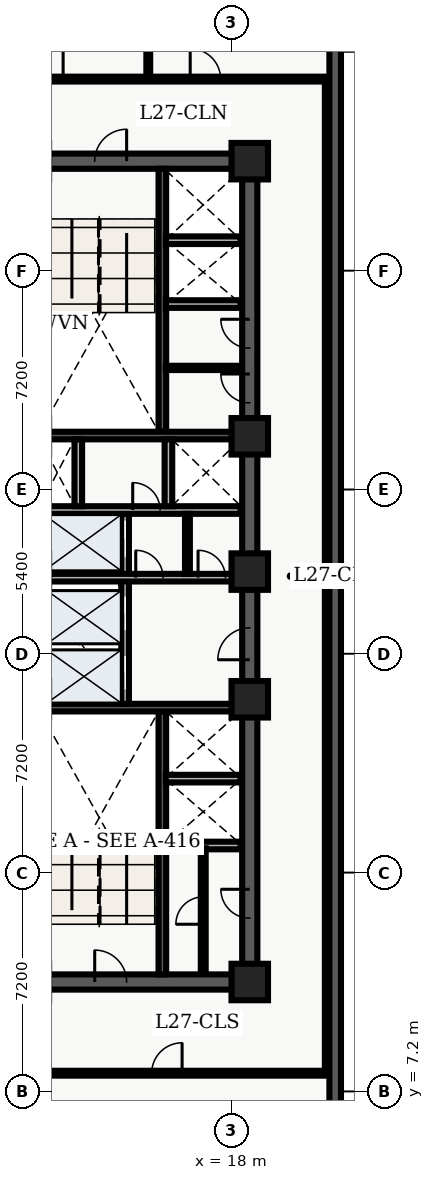
"""IFC4 building model, lengths in metres.
Left out: names, types, materials, properties, quantities, classifications, styles, units other than length and angle.
Written with IfcOpenShell. Run it as: python <this file> out.ifc"""

import sys

from ifc_helpers import new_model, entity, si_unit, converted_unit, direction, frame, origin_with_axes, origin_2d_with_axis, place, context, subcontext, project, spatial, polyline, rectangle, outline, extrude, element, fill, save


model = new_model("IFC4")
c1 = context("Model", 3, precision=1e-05, world=origin_with_axes(), true_north=direction((0.0, 1.0)))
c2 = subcontext(c1, "Body", "Model", "MODEL_VIEW")
j1 = project(units=[si_unit("LENGTHUNIT", "METRE"), converted_unit("PLANEANGLEUNIT", "DEGREE", entity("IfcPlaneAngleMeasure", 0.017), si_unit("PLANEANGLEUNIT", "RADIAN"), dimensions=[0, 0, 0, 0, 0, 0, 0])], contexts=[c1])
p1 = place(None, origin_with_axes())
s1 = spatial("IfcSite", under=j1, at=p1, CompositionType="ELEMENT")
p2 = place(p1, origin_with_axes())
s2 = spatial("IfcBuilding", under=s1, at=p2, CompositionType="ELEMENT")
p3 = place(p2, frame((0.0, 0.0, 112.5), z_axis=(0.0, 0.0, 1.0), x_axis=(1.0, 0.0, 0.0)))
s3 = spatial("IfcBuildingStorey", under=s2, at=p3, CompositionType="ELEMENT", Elevation=112.5)
p4 = place(p3, frame((11.4, 10.8, 0.0), z_axis=(0.0, 0.0, 1.0), x_axis=(1.0, 0.0, 0.0)))
e1 = element("IfcWall", 1, at=p4, inside=s3, PredefinedType="SHEAR", context=c2, shape_type="SweptSolid", body=[
    extrude(outline(polyline([(0.0, -0.25), (7.2, -0.25), (7.2, 0.25), (0.0, 0.25), (0.0, -0.25)])), origin_with_axes(), (0.0, 0.0, 1.0), 3.66),
])
p5 = place(p4, frame((2.625, 0.0, 0.0), z_axis=(0.0, 0.0, 1.0), x_axis=(1.0, 0.0, 0.0)))
e2 = element("IfcOpeningElement", 2, at=p5, cuts=e1, PredefinedType="OPENING", context=c2, shape_type="SweptSolid", body=[
    extrude(rectangle(XDim=1.05, YDim=0.52, at=origin_2d_with_axis()), origin_with_axes(), (0.0, 0.0, 1.0), 2.15),
])
p6 = place(p3, frame((11.4, 37.8, 0.0), z_axis=(0.0, 0.0, 1.0), x_axis=(1.0, 0.0, 0.0)))
e3 = element("IfcWall", 3, at=p6, inside=s3, PredefinedType="SHEAR", context=c2, shape_type="SweptSolid", body=[
    extrude(outline(polyline([(0.0, -0.25), (7.2, -0.25), (7.2, 0.25), (0.0, 0.25), (0.0, -0.25)])), origin_with_axes(), (0.0, 0.0, 1.0), 3.66),
])
p7 = place(p6, frame((2.625, 0.0, 0.0), z_axis=(0.0, 0.0, 1.0), x_axis=(1.0, 0.0, 0.0)))
e4 = element("IfcOpeningElement", 4, at=p7, cuts=e3, PredefinedType="OPENING", context=c2, shape_type="SweptSolid", body=[
    extrude(rectangle(XDim=1.05, YDim=0.52, at=origin_2d_with_axis()), origin_with_axes(), (0.0, 0.0, 1.0), 2.15),
])
p8 = place(p3, frame((18.6, 10.8, 0.0), z_axis=(0.0, 0.0, 1.0), x_axis=(0.0, 1.0, 0.0)))
e5 = element("IfcWall", 5, at=p8, inside=s3, PredefinedType="SHEAR", context=c2, shape_type="SweptSolid", body=[
    extrude(outline(polyline([(0.0, -0.25), (13.5, -0.25), (13.5, 0.25), (0.0, 0.25), (0.0, -0.25)])), origin_with_axes(), (0.0, 0.0, 1.0), 3.66),
])
p9 = place(p8, frame((11.125, 0.0, 0.0), z_axis=(0.0, 0.0, 1.0), x_axis=(1.0, 0.0, 0.0)))
e6 = element("IfcOpeningElement", 6, at=p9, cuts=e5, PredefinedType="OPENING", context=c2, shape_type="SweptSolid", body=[
    extrude(rectangle(XDim=1.05, YDim=0.52, at=origin_2d_with_axis()), origin_with_axes(), (0.0, 0.0, 1.0), 2.15),
])
p10 = place(p8, frame((2.575, 0.0, 0.0), z_axis=(0.0, 0.0, 1.0), x_axis=(1.0, 0.0, 0.0)))
e7 = element("IfcOpeningElement", 7, at=p10, cuts=e5, PredefinedType="OPENING", context=c2, shape_type="SweptSolid", body=[
    extrude(rectangle(XDim=0.95, YDim=0.52, at=origin_2d_with_axis()), origin_with_axes(), (0.0, 0.0, 1.0), 2.15),
])
p11 = place(p3, frame((18.6, 24.3, 0.0), z_axis=(0.0, 0.0, 1.0), x_axis=(0.0, 1.0, 0.0)))
e8 = element("IfcWall", 8, at=p11, inside=s3, PredefinedType="SHEAR", context=c2, shape_type="SweptSolid", body=[
    extrude(outline(polyline([(0.0, -0.25), (13.5, -0.25), (13.5, 0.25), (0.0, 0.25), (0.0, -0.25)])), origin_with_axes(), (0.0, 0.0, 1.0), 3.66),
])
p12 = place(p11, frame((6.025, 0.0, 0.0), z_axis=(0.0, 0.0, 1.0), x_axis=(1.0, 0.0, 0.0)))
e9 = element("IfcOpeningElement", 9, at=p12, cuts=e8, PredefinedType="OPENING", context=c2, shape_type="SweptSolid", body=[
    extrude(rectangle(XDim=0.95, YDim=0.52, at=origin_2d_with_axis()), origin_with_axes(), (0.0, 0.0, 1.0), 2.15),
])
p13 = place(p11, frame((7.825, 0.0, 0.0), z_axis=(0.0, 0.0, 1.0), x_axis=(1.0, 0.0, 0.0)))
e10 = element("IfcOpeningElement", 10, at=p13, cuts=e8, PredefinedType="OPENING", context=c2, shape_type="SweptSolid", body=[
    extrude(rectangle(XDim=0.95, YDim=0.52, at=origin_2d_with_axis()), origin_with_axes(), (0.0, 0.0, 1.0), 2.15),
])
p14 = place(p3, frame((15.725, 11.05, 0.0), z_axis=(0.0, 0.0, 1.0), x_axis=(0.0, 1.0, 0.0)))
e11 = element("IfcWall", 11, at=p14, inside=s3, PredefinedType="SHEAR", context=c2, shape_type="SweptSolid", body=[
    extrude(outline(polyline([(0.0, -0.125), (8.65, -0.125), (8.65, 0.125), (0.0, 0.125), (0.0, -0.125)])), origin_with_axes(), (0.0, 0.0, 1.0), 3.66),
])
p15 = place(p3, frame((11.65, 19.825, 0.0), z_axis=(0.0, 0.0, 1.0), x_axis=(1.0, 0.0, 0.0)))
e12 = element("IfcWall", 12, at=p15, inside=s3, PredefinedType="SHEAR", context=c2, shape_type="SweptSolid", body=[
    extrude(outline(polyline([(0.0, -0.125), (6.7, -0.125), (6.7, 0.125), (0.0, 0.125), (0.0, -0.125)])), origin_with_axes(), (0.0, 0.0, 1.0), 3.66),
])
p16 = place(p3, frame((15.725, 28.9, 0.0), z_axis=(0.0, 0.0, 1.0), x_axis=(0.0, 1.0, 0.0)))
e13 = element("IfcWall", 13, at=p16, inside=s3, PredefinedType="SHEAR", context=c2, shape_type="SweptSolid", body=[
    extrude(outline(polyline([(0.0, -0.125), (8.65, -0.125), (8.65, 0.125), (0.0, 0.125), (0.0, -0.125)])), origin_with_axes(), (0.0, 0.0, 1.0), 3.66),
])
p17 = place(p3, frame((11.65, 28.775, 0.0), z_axis=(0.0, 0.0, 1.0), x_axis=(1.0, 0.0, 0.0)))
e14 = element("IfcWall", 14, at=p17, inside=s3, PredefinedType="SHEAR", context=c2, shape_type="SweptSolid", body=[
    extrude(outline(polyline([(0.0, -0.125), (6.7, -0.125), (6.7, 0.125), (0.0, 0.125), (0.0, -0.125)])), origin_with_axes(), (0.0, 0.0, 1.0), 3.66),
])
p18 = place(p3, frame((14.5, 19.95, 0.0), z_axis=(0.0, 0.0, 1.0), x_axis=(0.0, 1.0, 0.0)))
e15 = element("IfcWall", 15, at=p18, inside=s3, PredefinedType="SOLIDWALL", context=c2, shape_type="SweptSolid", body=[
    extrude(outline(polyline([(0.0, -0.125), (6.25, -0.125), (6.25, 0.125), (0.0, 0.125), (0.0, -0.125)])), origin_with_axes(), (0.0, 0.0, 1.0), 2.7),
])
p19 = place(p18, frame((1.025, 0.0, 0.0), z_axis=(0.0, 0.0, 1.0), x_axis=(1.0, 0.0, 0.0)))
e16 = element("IfcOpeningElement", 16, at=p19, cuts=e15, PredefinedType="OPENING", context=c2, shape_type="SweptSolid", body=[
    extrude(rectangle(XDim=1.1, YDim=0.27, at=origin_2d_with_axis()), origin_with_axes(), (0.0, 0.0, 1.0), 2.15),
])
p20 = place(p18, frame((2.975, 0.0, 0.0), z_axis=(0.0, 0.0, 1.0), x_axis=(1.0, 0.0, 0.0)))
e17 = element("IfcOpeningElement", 17, at=p20, cuts=e15, PredefinedType="OPENING", context=c2, shape_type="SweptSolid", body=[
    extrude(rectangle(XDim=1.1, YDim=0.27, at=origin_2d_with_axis()), origin_with_axes(), (0.0, 0.0, 1.0), 2.15),
])
p21 = place(p18, frame((5.425, 0.0, 0.0), z_axis=(0.0, 0.0, 1.0), x_axis=(1.0, 0.0, 0.0)))
e18 = element("IfcOpeningElement", 18, at=p21, cuts=e15, PredefinedType="OPENING", context=c2, shape_type="SweptSolid", body=[
    extrude(rectangle(XDim=1.2, YDim=0.27, at=origin_2d_with_axis()), origin_with_axes(), (0.0, 0.0, 1.0), 2.15),
])
p22 = place(p3, frame((11.7, 24.1, 0.0), z_axis=(0.0, 0.0, 1.0), x_axis=(1.0, 0.0, 0.0)))
e19 = element("IfcWall", 19, at=p22, inside=s3, PredefinedType="SOLIDWALL", context=c2, shape_type="SweptSolid", body=[
    extrude(outline(polyline([(0.0, -0.125), (6.6, -0.125), (6.6, 0.125), (0.0, 0.125), (0.0, -0.125)])), origin_with_axes(), (0.0, 0.0, 1.0), 2.7),
])
p23 = place(p22, frame((3.6, 0.0, 0.0), z_axis=(0.0, 0.0, 1.0), x_axis=(1.0, 0.0, 0.0)))
e20 = element("IfcOpeningElement", 20, at=p23, cuts=e19, PredefinedType="OPENING", context=c2, shape_type="SweptSolid", body=[
    extrude(rectangle(XDim=0.9, YDim=0.27, at=origin_2d_with_axis()), origin_with_axes(), (0.0, 0.0, 1.0), 2.15),
])
p24 = place(p22, frame((5.65, 0.0, 0.0), z_axis=(0.0, 0.0, 1.0), x_axis=(1.0, 0.0, 0.0)))
e21 = element("IfcOpeningElement", 21, at=p24, cuts=e19, PredefinedType="OPENING", context=c2, shape_type="SweptSolid", body=[
    extrude(rectangle(XDim=0.9, YDim=0.27, at=origin_2d_with_axis()), origin_with_axes(), (0.0, 0.0, 1.0), 2.15),
])
p25 = place(p3, frame((11.7, 26.325, 0.0), z_axis=(0.0, 0.0, 1.0), x_axis=(1.0, 0.0, 0.0)))
e22 = element("IfcWall", 22, at=p25, inside=s3, PredefinedType="SOLIDWALL", context=c2, shape_type="SweptSolid", body=[
    extrude(outline(polyline([(0.0, -0.125), (6.6, -0.125), (6.6, 0.125), (0.0, 0.125), (0.0, -0.125)])), origin_with_axes(), (0.0, 0.0, 1.0), 2.7),
])
p26 = place(p25, frame((3.5, 0.0, 0.0), z_axis=(0.0, 0.0, 1.0), x_axis=(1.0, 0.0, 0.0)))
e23 = element("IfcOpeningElement", 23, at=p26, cuts=e22, PredefinedType="OPENING", context=c2, shape_type="SweptSolid", body=[
    extrude(rectangle(XDim=0.9, YDim=0.27, at=origin_2d_with_axis()), origin_with_axes(), (0.0, 0.0, 1.0), 2.15),
])
for number, where, z_axis, x_axis in (
    (24, (12.96, 26.45, 0.0), (0.0, 0.0, 1.0), (0.0, 1.0, 0.0)),
    (25, (15.925, 26.45, 0.0), (0.0, 0.0, 1.0), (0.0, 1.0, 0.0)),
):
    element("IfcWall", number, at=place(p3, frame(where, z_axis=z_axis, x_axis=x_axis)), inside=s3, PredefinedType="SOLIDWALL", context=c2, shape_type="SweptSolid", body=[
        extrude(outline(polyline([(0.0, -0.125), (2.2, -0.125), (2.2, 0.125), (0.0, 0.125), (0.0, -0.125)])), origin_with_axes(), (0.0, 0.0, 1.0), 2.7),
    ])
for number, where, z_axis, x_axis in (
    (26, (18.6, 10.8, 0.0), (0.0, 0.0, 1.0), (1.0, 0.0, 0.0)),
    (27, (18.6, 20.1, 0.0), (0.0, 0.0, 1.0), (1.0, 0.0, 0.0)),
    (28, (18.6, 24.3, 0.0), (0.0, 0.0, 1.0), (1.0, 0.0, 0.0)),
    (29, (18.6, 28.75, 0.0), (0.0, 0.0, 1.0), (1.0, 0.0, 0.0)),
    (30, (18.6, 37.8, 0.0), (0.0, 0.0, 1.0), (1.0, 0.0, 0.0)),
):
    element("IfcColumn", number, at=place(p3, frame(where, z_axis=z_axis, x_axis=x_axis)), inside=s3, PredefinedType="COLUMN", context=c2, shape_type="SweptSolid", body=[
        extrude(rectangle(XDim=1.2, YDim=1.2, at=origin_2d_with_axis()), origin_with_axes(), (0.0, 0.0, 1.0), 3.9),
    ])
p27 = place(p3, frame((16.55, 24.22, 0.0), z_axis=(0.0, 0.0, 1.0), x_axis=(0.0, 1.0, 0.0)))
e31 = element("IfcWall", 31, at=p27, inside=s3, PredefinedType="PARTITIONING", context=c2, shape_type="SweptSolid", body=[
    extrude(outline(polyline([(0.0, -0.08), (1.98, -0.08), (1.98, 0.08), (0.0, 0.08), (0.0, -0.08)])), origin_with_axes(), (0.0, 0.0, 1.0), 2.7),
])
for number, where, z_axis, x_axis in (
    (32, (15.84, 15.29, 0.0), (0.0, 0.0, 1.0), (1.0, 0.0, 0.0)),
    (33, (15.84, 17.49, 0.0), (0.0, 0.0, 1.0), (1.0, 0.0, 0.0)),
):
    element("IfcWall", number, at=place(p3, frame(where, z_axis=z_axis, x_axis=x_axis)), inside=s3, PredefinedType="SOLIDWALL", context=c2, shape_type="SweptSolid", body=[
        extrude(outline(polyline([(0.0, -0.125), (2.46, -0.125), (2.46, 0.125), (0.0, 0.125), (0.0, -0.125)])), origin_with_axes(), (0.0, 0.0, 1.0), 2.7),
    ])
p28 = place(p3, frame((17.07, 11.1, 0.0), z_axis=(0.0, 0.0, 1.0), x_axis=(0.0, 1.0, 0.0)))
e34 = element("IfcWall", 34, at=p28, inside=s3, PredefinedType="PARTITIONING", context=c2, shape_type="SweptSolid", body=[
    extrude(outline(polyline([(0.0, -0.08), (4.1, -0.08), (4.1, 0.08), (0.0, 0.08), (0.0, -0.08)])), origin_with_axes(), (0.0, 0.0, 1.0), 2.7),
])
p29 = place(p28, frame((2.05, 0.0, 0.0), z_axis=(0.0, 0.0, 1.0), x_axis=(1.0, 0.0, 0.0)))
e35 = element("IfcOpeningElement", 35, at=p29, cuts=e34, PredefinedType="OPENING", context=c2, shape_type="SweptSolid", body=[
    extrude(rectangle(XDim=0.9, YDim=0.18, at=origin_2d_with_axis()), origin_with_axes(), (0.0, 0.0, 1.0), 2.15),
])
for number, where, z_axis, x_axis in (
    (36, (15.84, 33.1, 0.0), (0.0, 0.0, 1.0), (1.0, 0.0, 0.0)),
    (37, (15.84, 35.2, 0.0), (0.0, 0.0, 1.0), (1.0, 0.0, 0.0)),
):
    element("IfcWall", number, at=place(p3, frame(where, z_axis=z_axis, x_axis=x_axis)), inside=s3, PredefinedType="SOLIDWALL", context=c2, shape_type="SweptSolid", body=[
        extrude(outline(polyline([(0.0, -0.125), (2.46, -0.125), (2.46, 0.125), (0.0, 0.125), (0.0, -0.125)])), origin_with_axes(), (0.0, 0.0, 1.0), 2.7),
    ])
p30 = place(p3, frame((15.84, 31.0, 0.0), z_axis=(0.0, 0.0, 1.0), x_axis=(1.0, 0.0, 0.0)))
e38 = element("IfcWall", 38, at=p30, inside=s3, PredefinedType="PARTITIONING", context=c2, shape_type="SweptSolid", body=[
    extrude(outline(polyline([(0.0, -0.07), (2.46, -0.07), (2.46, 0.07), (0.0, 0.07), (0.0, -0.07)])), origin_with_axes(), (0.0, 0.0, 1.0), 2.7),
])
p31 = place(p3, frame((2.6, 7.8, 0.0), z_axis=(0.0, 0.0, 1.0), x_axis=(1.0, 0.0, 0.0)))
e39 = element("IfcWall", 39, at=p31, inside=s3, PredefinedType="PARTITIONING", context=c2, shape_type="SweptSolid", body=[
    extrude(outline(polyline([(0.0, -0.08), (18.625, -0.08), (18.625, 0.08), (0.0, 0.08), (0.0, -0.08)])), origin_with_axes(), (0.0, 0.0, 1.0), 2.7),
])
p32 = place(p31, frame((3.459, 0.0, 0.0), z_axis=(0.0, 0.0, 1.0), x_axis=(1.0, 0.0, 0.0)))
e40 = element("IfcOpeningElement", 40, at=p32, cuts=e39, PredefinedType="OPENING", context=c2, shape_type="SweptSolid", body=[
    extrude(rectangle(XDim=1.2, YDim=0.18, at=origin_2d_with_axis()), origin_with_axes(), (0.0, 0.0, 1.0), 2.2),
])
p33 = place(p31, frame((13.274, 0.0, 0.0), z_axis=(0.0, 0.0, 1.0), x_axis=(1.0, 0.0, 0.0)))
e41 = element("IfcOpeningElement", 41, at=p33, cuts=e39, PredefinedType="OPENING", context=c2, shape_type="SweptSolid", body=[
    extrude(rectangle(XDim=1.0, YDim=0.18, at=origin_2d_with_axis()), origin_with_axes(), (0.0, 0.0, 1.0), 2.15),
])
p34 = place(p3, frame((2.6, 40.5, 0.0), z_axis=(0.0, 0.0, 1.0), x_axis=(1.0, 0.0, 0.0)))
e42 = element("IfcWall", 42, at=p34, inside=s3, PredefinedType="PARTITIONING", context=c2, shape_type="SweptSolid", body=[
    extrude(outline(polyline([(0.0, -0.08), (18.65, -0.08), (18.65, 0.08), (0.0, 0.08), (0.0, -0.08)])), origin_with_axes(), (0.0, 0.0, 1.0), 2.7),
])
p35 = place(p34, frame((2.045, 0.0, 0.0), z_axis=(0.0, 0.0, 1.0), x_axis=(1.0, 0.0, 0.0)))
e43 = element("IfcOpeningElement", 43, at=p35, cuts=e42, PredefinedType="OPENING", context=c2, shape_type="SweptSolid", body=[
    extrude(rectangle(XDim=1.0, YDim=0.18, at=origin_2d_with_axis()), origin_with_axes(), (0.0, 0.0, 1.0), 2.15),
])
p36 = place(p34, frame((9.261, 0.0, 0.0), z_axis=(0.0, 0.0, 1.0), x_axis=(1.0, 0.0, 0.0)))
e44 = element("IfcOpeningElement", 44, at=p36, cuts=e42, PredefinedType="OPENING", context=c2, shape_type="SweptSolid", body=[
    extrude(rectangle(XDim=1.2, YDim=0.18, at=origin_2d_with_axis()), origin_with_axes(), (0.0, 0.0, 1.0), 2.2),
])
p37 = place(p34, frame((14.541, 0.0, 0.0), z_axis=(0.0, 0.0, 1.0), x_axis=(1.0, 0.0, 0.0)))
e45 = element("IfcOpeningElement", 45, at=p37, cuts=e42, PredefinedType="OPENING", context=c2, shape_type="SweptSolid", body=[
    extrude(rectangle(XDim=1.0, YDim=0.18, at=origin_2d_with_axis()), origin_with_axes(), (0.0, 0.0, 1.0), 2.15),
])
p38 = place(p3, frame((21.15, 7.8, 0.0), z_axis=(0.0, 0.0, 1.0), x_axis=(0.0, 1.0, 0.0)))
e46 = element("IfcWall", 46, at=p38, inside=s3, PredefinedType="PARTITIONING", context=c2, shape_type="SweptSolid", body=[
    extrude(outline(polyline([(0.0, -0.08), (32.7, -0.08), (32.7, 0.08), (0.0, 0.08), (0.0, -0.08)])), origin_with_axes(), (0.0, 0.0, 1.0), 2.7),
])
p39 = place(p3, frame((15.262, 40.6, 0.0), z_axis=(0.0, 0.0, 1.0), x_axis=(0.0, 1.0, 0.0)))
e47 = element("IfcWall", 47, at=p39, inside=s3, PredefinedType="PARTITIONING", context=c2, shape_type="SweptSolid", body=[
    extrude(outline(polyline([(0.0, -0.062), (7.64, -0.062), (7.64, 0.062), (0.0, 0.062), (0.0, -0.062)])), origin_with_axes(), (0.0, 0.0, 1.0), 2.7),
])
p40 = place(p3, frame((21.41, 45.82, 0.0), z_axis=(0.0, 0.0, 1.0), x_axis=(0.0, -1.0, 0.0)))
e48 = element("IfcWall", 48, at=p40, inside=s3, PredefinedType="SOLIDWALL", context=c2, shape_type="SweptSolid", body=[
    extrude(outline(polyline([(0.0, -0.19), (45.82, -0.19), (45.82, 0.19), (0.0, 0.19), (0.0, -0.19)])), origin_with_axes(), (0.0, 0.0, 1.0), 3.66),
])
p41 = place(p40, frame((3.079, 0.0, 0.45), z_axis=(0.0, 0.0, 1.0), x_axis=(1.0, 0.0, 0.0)))
e49 = element("IfcOpeningElement", 49, at=p41, cuts=e48, PredefinedType="OPENING", context=c2, shape_type="SweptSolid", body=[
    extrude(rectangle(XDim=2.1, YDim=0.4, at=origin_2d_with_axis()), origin_with_axes(), (0.0, 0.0, 1.0), 2.2),
])
p42 = place(p40, frame((42.741, 0.0, 0.45), z_axis=(0.0, 0.0, 1.0), x_axis=(1.0, 0.0, 0.0)))
e50 = element("IfcOpeningElement", 50, at=p42, cuts=e48, PredefinedType="OPENING", context=c2, shape_type="SweptSolid", body=[
    extrude(rectangle(XDim=2.1, YDim=0.4, at=origin_2d_with_axis()), origin_with_axes(), (0.0, 0.0, 1.0), 2.2),
])
p43 = place(p18, frame((1.025, 0.0, 0.0), z_axis=(0.0, 0.0, 1.0), x_axis=(1.0, 0.0, 0.0)))
e51 = element("IfcDoor", 51, at=p43, inside=s3, OperationType="SLIDING_TO_LEFT", PredefinedType="DOOR", context=c2, shape_type="SweptSolid", body=[
    extrude(rectangle(XDim=1.1, YDim=0.09, at=origin_2d_with_axis()), origin_with_axes(), (0.0, 0.0, 1.0), 2.15),
])
fill(e16, e51)
p44 = place(p18, frame((2.975, 0.0, 0.0), z_axis=(0.0, 0.0, 1.0), x_axis=(1.0, 0.0, 0.0)))
e52 = element("IfcDoor", 52, at=p44, inside=s3, OperationType="SLIDING_TO_RIGHT", PredefinedType="DOOR", context=c2, shape_type="SweptSolid", body=[
    extrude(rectangle(XDim=1.1, YDim=0.09, at=origin_2d_with_axis()), origin_with_axes(), (0.0, 0.0, 1.0), 2.15),
])
fill(e17, e52)
p45 = place(p18, frame((5.425, 0.0, 0.0), z_axis=(0.0, 0.0, 1.0), x_axis=(1.0, 0.0, 0.0)))
e53 = element("IfcDoor", 53, at=p45, inside=s3, OperationType="DOUBLE_DOOR_SLIDING", PredefinedType="DOOR", context=c2, shape_type="SweptSolid", body=[
    extrude(rectangle(XDim=1.2, YDim=0.09, at=origin_2d_with_axis()), origin_with_axes(), (0.0, 0.0, 1.0), 2.15),
])
fill(e18, e53)
p46 = place(p4, frame((2.625, 0.0, 0.0), z_axis=(0.0, 0.0, 1.0), x_axis=(1.0, 0.0, 0.0)))
e54 = element("IfcDoor", 54, at=p46, inside=s3, OperationType="SINGLE_SWING_LEFT", PredefinedType="DOOR", context=c2, shape_type="SweptSolid", body=[
    extrude(rectangle(XDim=1.05, YDim=0.09, at=origin_2d_with_axis()), origin_with_axes(), (0.0, 0.0, 1.0), 2.15),
])
fill(e2, e54)
p47 = place(p6, frame((2.625, 0.0, 0.0), z_axis=(0.0, 0.0, 1.0), x_axis=(1.0, 0.0, 0.0)))
e55 = element("IfcDoor", 55, at=p47, inside=s3, OperationType="SINGLE_SWING_RIGHT", PredefinedType="DOOR", context=c2, shape_type="SweptSolid", body=[
    extrude(rectangle(XDim=1.05, YDim=0.09, at=origin_2d_with_axis()), origin_with_axes(), (0.0, 0.0, 1.0), 2.15),
])
fill(e4, e55)
p48 = place(p8, frame((11.125, 0.0, 0.0), z_axis=(0.0, 0.0, 1.0), x_axis=(1.0, 0.0, 0.0)))
e56 = element("IfcDoor", 56, at=p48, inside=s3, OperationType="SINGLE_SWING_LEFT", PredefinedType="DOOR", context=c2, shape_type="SweptSolid", body=[
    extrude(rectangle(XDim=1.05, YDim=0.09, at=origin_2d_with_axis()), origin_with_axes(), (0.0, 0.0, 1.0), 2.15),
])
fill(e6, e56)
p49 = place(p22, frame((3.6, 0.0, 0.0), z_axis=(0.0, 0.0, 1.0), x_axis=(1.0, 0.0, 0.0)))
e57 = element("IfcDoor", 57, at=p49, inside=s3, OperationType="SINGLE_SWING_LEFT", PredefinedType="DOOR", context=c2, shape_type="SweptSolid", body=[
    extrude(rectangle(XDim=0.9, YDim=0.09, at=origin_2d_with_axis()), origin_with_axes(), (0.0, 0.0, 1.0), 2.15),
])
fill(e20, e57)
p50 = place(p22, frame((5.65, 0.0, 0.0), z_axis=(0.0, 0.0, 1.0), x_axis=(1.0, 0.0, 0.0)))
e58 = element("IfcDoor", 58, at=p50, inside=s3, OperationType="SINGLE_SWING_LEFT", PredefinedType="DOOR", context=c2, shape_type="SweptSolid", body=[
    extrude(rectangle(XDim=0.9, YDim=0.09, at=origin_2d_with_axis()), origin_with_axes(), (0.0, 0.0, 1.0), 2.15),
])
fill(e21, e58)
p51 = place(p25, frame((3.5, 0.0, 0.0), z_axis=(0.0, 0.0, 1.0), x_axis=(1.0, 0.0, 0.0)))
e59 = element("IfcDoor", 59, at=p51, inside=s3, OperationType="SINGLE_SWING_LEFT", PredefinedType="DOOR", context=c2, shape_type="SweptSolid", body=[
    extrude(rectangle(XDim=0.9, YDim=0.09, at=origin_2d_with_axis()), origin_with_axes(), (0.0, 0.0, 1.0), 2.15),
])
fill(e23, e59)
p52 = place(p28, frame((2.05, 0.0, 0.0), z_axis=(0.0, 0.0, 1.0), x_axis=(1.0, 0.0, 0.0)))
e60 = element("IfcDoor", 60, at=p52, inside=s3, OperationType="SINGLE_SWING_LEFT", PredefinedType="DOOR", context=c2, shape_type="SweptSolid", body=[
    extrude(rectangle(XDim=0.9, YDim=0.09, at=origin_2d_with_axis()), origin_with_axes(), (0.0, 0.0, 1.0), 2.15),
])
fill(e35, e60)
p53 = place(p8, frame((2.575, 0.0, 0.0), z_axis=(0.0, 0.0, 1.0), x_axis=(1.0, 0.0, 0.0)))
e61 = element("IfcDoor", 61, at=p53, inside=s3, OperationType="SINGLE_SWING_RIGHT", PredefinedType="DOOR", context=c2, shape_type="SweptSolid", body=[
    extrude(rectangle(XDim=0.95, YDim=0.09, at=origin_2d_with_axis()), origin_with_axes(), (0.0, 0.0, 1.0), 2.15),
])
fill(e7, e61)
p54 = place(p11, frame((6.025, 0.0, 0.0), z_axis=(0.0, 0.0, 1.0), x_axis=(1.0, 0.0, 0.0)))
e62 = element("IfcDoor", 62, at=p54, inside=s3, OperationType="SINGLE_SWING_RIGHT", PredefinedType="DOOR", context=c2, shape_type="SweptSolid", body=[
    extrude(rectangle(XDim=0.95, YDim=0.09, at=origin_2d_with_axis()), origin_with_axes(), (0.0, 0.0, 1.0), 2.15),
])
fill(e9, e62)
p55 = place(p11, frame((7.825, 0.0, 0.0), z_axis=(0.0, 0.0, 1.0), x_axis=(1.0, 0.0, 0.0)))
e63 = element("IfcDoor", 63, at=p55, inside=s3, OperationType="SINGLE_SWING_RIGHT", PredefinedType="DOOR", context=c2, shape_type="SweptSolid", body=[
    extrude(rectangle(XDim=0.95, YDim=0.09, at=origin_2d_with_axis()), origin_with_axes(), (0.0, 0.0, 1.0), 2.15),
])
fill(e10, e63)
p56 = place(p31, frame((13.274, 0.0, 0.0), z_axis=(0.0, 0.0, 1.0), x_axis=(1.0, 0.0, 0.0)))
e64 = element("IfcDoor", 64, at=p56, inside=s3, OperationType="SINGLE_SWING_RIGHT", PredefinedType="DOOR", context=c2, shape_type="SweptSolid", body=[
    extrude(rectangle(XDim=1.0, YDim=0.09, at=origin_2d_with_axis()), origin_with_axes(), (0.0, 0.0, 1.0), 2.15),
])
fill(e41, e64)
p57 = place(p34, frame((9.261, 0.0, 0.0), z_axis=(0.0, 0.0, 1.0), x_axis=(1.0, 0.0, 0.0)))
e65 = element("IfcDoor", 65, at=p57, inside=s3, OperationType="SINGLE_SWING_RIGHT", PredefinedType="DOOR", context=c2, shape_type="SweptSolid", body=[
    extrude(rectangle(XDim=1.2, YDim=0.09, at=origin_2d_with_axis()), origin_with_axes(), (0.0, 0.0, 1.0), 2.2),
])
fill(e44, e65)
p58 = place(p34, frame((14.541, 0.0, 0.0), z_axis=(0.0, 0.0, 1.0), x_axis=(1.0, 0.0, 0.0)))
e66 = element("IfcDoor", 66, at=p58, inside=s3, OperationType="SINGLE_SWING_LEFT", PredefinedType="DOOR", context=c2, shape_type="SweptSolid", body=[
    extrude(rectangle(XDim=1.0, YDim=0.09, at=origin_2d_with_axis()), origin_with_axes(), (0.0, 0.0, 1.0), 2.15),
])
fill(e45, e66)
save(model, sys.argv[1])
